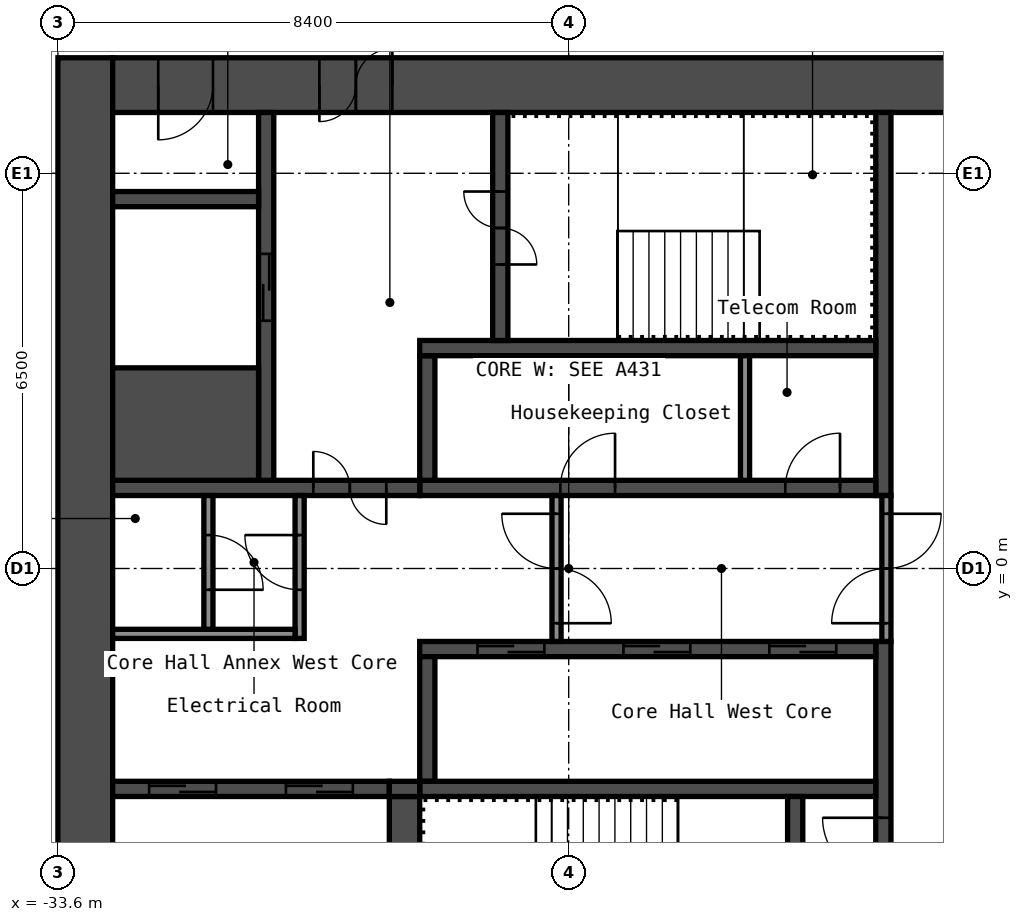
"""IFC4 building model, lengths in metres.
Left out: names, types, materials, properties, quantities, classifications, styles, units other than length and angle.
Written with IfcOpenShell. Run it as: python <this file> out.ifc"""

import sys

from ifc_helpers import new_model, si_unit, direction, frame, frame_2d, origin, place, context, subcontext, project, spatial, rectangle, extrude, element, fill, save


model = new_model("IFC4")
c1 = context("Model", 3, precision=1e-05, world=origin(), true_north=direction((0.0, 1.0)))
c2 = subcontext(c1, "Body", "Model", "MODEL_VIEW")
j1 = project(units=[si_unit("LENGTHUNIT", "METRE"), si_unit("PLANEANGLEUNIT", "RADIAN")], contexts=[c1])
p1 = place(None, origin())
s1 = spatial("IfcSite", under=j1, at=p1, CompositionType="ELEMENT")
p2 = place(p1, origin())
s2 = spatial("IfcBuilding", under=s1, at=p2, CompositionType="ELEMENT")
p3 = place(p2, frame((0.0, 0.0, 215.4)))
s3 = spatial("IfcBuildingStorey", under=s2, at=p3, CompositionType="ELEMENT", Elevation=215.4)
p4 = place(p3, frame((-33.15, -8.4, 0.0), z_axis=(0.0, 0.0, 1.0), x_axis=(0.0, 1.0, 0.0)))
e1 = element("IfcWall", 1, at=p4, inside=s3, PredefinedType="SHEAR", context=c2, shape_type="SweptSolid", body=[
    extrude(rectangle(XDim=16.8, YDim=0.9, at=frame_2d((8.4, 0.0))), origin(), (0.0, 0.0, 1.0), 2.75),
])
p5 = place(p3, frame((-32.7, 7.95, 0.0), z_axis=(0.0, 0.0, 1.0), x_axis=(1.0, 0.0, 0.0)))
e2 = element("IfcWall", 2, at=p5, inside=s3, PredefinedType="SHEAR", context=c2, shape_type="SweptSolid", body=[
    extrude(rectangle(XDim=15.0, YDim=0.9, at=frame_2d((7.5, 0.0))), origin(), (0.0, 0.0, 1.0), 2.75),
])
p6 = place(p5, frame((3.4, 0.0, 0.0)))
e3 = element("IfcOpeningElement", 3, at=p6, cuts=e2, PredefinedType="OPENING", context=c2, shape_type="SweptSolid", body=[
    extrude(rectangle(XDim=1.2, YDim=2.1, at=frame_2d((0.6, 1.05))), frame((0.0, 0.46, 0.0), z_axis=(0.0, -1.0, 0.0), x_axis=(1.0, 0.0, 0.0)), (0.0, 0.0, 1.0), 0.92),
])
p7 = place(p5, frame((0.75, 0.0, 0.0)))
e4 = element("IfcOpeningElement", 4, at=p7, cuts=e2, PredefinedType="OPENING", context=c2, shape_type="SweptSolid", body=[
    extrude(rectangle(XDim=0.9, YDim=2.1, at=frame_2d((0.45, 1.05))), frame((0.0, 0.46, 0.0), z_axis=(0.0, -1.0, 0.0), x_axis=(1.0, 0.0, 0.0)), (0.0, 0.0, 1.0), 0.92),
])
p8 = place(p3, frame((-20.025, 1.2, 0.0), z_axis=(0.0, 0.0, 1.0), x_axis=(0.0, 1.0, 0.0)))
e5 = element("IfcWall", 5, at=p8, inside=s3, PredefinedType="SHEAR", context=c2, shape_type="SweptSolid", body=[
    extrude(rectangle(XDim=6.3, YDim=0.25, at=frame_2d((3.15, 0.0))), origin(), (0.0, 0.0, 1.0), 2.75),
])
p9 = place(p3, frame((-20.025, -7.5, 0.0), z_axis=(0.0, 0.0, 1.0), x_axis=(0.0, 1.0, 0.0)))
e6 = element("IfcWall", 6, at=p9, inside=s3, PredefinedType="SHEAR", context=c2, shape_type="SweptSolid", body=[
    extrude(rectangle(XDim=6.3, YDim=0.25, at=frame_2d((3.15, 0.0))), origin(), (0.0, 0.0, 1.0), 2.75),
])
p10 = place(p9, frame((2.4, 0.0, 0.0)))
e7 = element("IfcOpeningElement", 7, at=p10, cuts=e6, PredefinedType="OPENING", context=c2, shape_type="SweptSolid", body=[
    extrude(rectangle(XDim=1.0, YDim=2.1, at=frame_2d((0.5, 1.05))), frame((0.0, 0.135, 0.0), z_axis=(0.0, -1.0, 0.0), x_axis=(1.0, 0.0, 0.0)), (0.0, 0.0, 1.0), 0.27),
])
p11 = place(p3, frame((-27.65, 1.325, 0.0), z_axis=(0.0, 0.0, 1.0), x_axis=(1.0, 0.0, 0.0)))
e8 = element("IfcWall", 8, at=p11, inside=s3, PredefinedType="SHEAR", context=c2, shape_type="SweptSolid", body=[
    extrude(rectangle(XDim=7.5, YDim=0.25, at=frame_2d((3.75, 0.0))), origin(), (0.0, 0.0, 1.0), 2.75),
])
p12 = place(p11, frame((6.012, 0.0, 0.0)))
e9 = element("IfcOpeningElement", 9, at=p12, cuts=e8, PredefinedType="OPENING", context=c2, shape_type="SweptSolid", body=[
    extrude(rectangle(XDim=0.9, YDim=2.1, at=frame_2d((0.45, 1.05))), frame((0.0, 0.135, 0.0), z_axis=(0.0, -1.0, 0.0), x_axis=(1.0, 0.0, 0.0)), (0.0, 0.0, 1.0), 0.27),
])
p13 = place(p11, frame((2.312, 0.0, 0.0)))
e10 = element("IfcOpeningElement", 10, at=p13, cuts=e8, PredefinedType="OPENING", context=c2, shape_type="SweptSolid", body=[
    extrude(rectangle(XDim=0.9, YDim=2.1, at=frame_2d((0.45, 1.05))), frame((0.0, 0.135, 0.0), z_axis=(0.0, -1.0, 0.0), x_axis=(1.0, 0.0, 0.0)), (0.0, 0.0, 1.0), 0.27),
])
p14 = place(p3, frame((-27.525, 1.45, 0.0), z_axis=(0.0, 0.0, 1.0), x_axis=(0.0, 1.0, 0.0)))
e11 = element("IfcWall", 11, at=p14, inside=s3, PredefinedType="SHEAR", context=c2, shape_type="SweptSolid", body=[
    extrude(rectangle(XDim=2.05, YDim=0.25, at=frame_2d((1.025, 0.0))), origin(), (0.0, 0.0, 1.0), 2.75),
])
p15 = place(p3, frame((-27.65, 3.625, 0.0), z_axis=(0.0, 0.0, 1.0), x_axis=(1.0, 0.0, 0.0)))
e12 = element("IfcWall", 12, at=p15, inside=s3, PredefinedType="SHEAR", context=c2, shape_type="SweptSolid", body=[
    extrude(rectangle(XDim=7.5, YDim=0.25, at=frame_2d((3.75, 0.0))), origin(), (0.0, 0.0, 1.0), 2.75),
])
p16 = place(p3, frame((-26.325, 3.75, 0.0), z_axis=(0.0, 0.0, 1.0), x_axis=(0.0, 1.0, 0.0)))
e13 = element("IfcWall", 13, at=p16, inside=s3, PredefinedType="SHEAR", context=c2, shape_type="SweptSolid", body=[
    extrude(rectangle(XDim=3.75, YDim=0.25, at=frame_2d((1.875, 0.0))), origin(), (0.0, 0.0, 1.0), 2.75),
])
p17 = place(p16, frame((1.25, 0.0, 0.0)))
e14 = element("IfcOpeningElement", 14, at=p17, cuts=e13, PredefinedType="OPENING", context=c2, shape_type="SweptSolid", body=[
    extrude(rectangle(XDim=1.2, YDim=2.1, at=frame_2d((0.6, 1.05))), frame((0.0, 0.135, 0.0), z_axis=(0.0, -1.0, 0.0), x_axis=(1.0, 0.0, 0.0)), (0.0, 0.0, 1.0), 0.27),
])
p18 = place(p3, frame((-32.7, 1.325, 0.0), z_axis=(0.0, 0.0, 1.0), x_axis=(1.0, 0.0, 0.0)))
e15 = element("IfcWall", 15, at=p18, inside=s3, PredefinedType="SHEAR", context=c2, shape_type="SweptSolid", body=[
    extrude(rectangle(XDim=5.05, YDim=0.25, at=frame_2d((2.525, 0.0))), origin(), (0.0, 0.0, 1.0), 2.75),
])
p19 = place(p18, frame((3.3, 0.0, 0.0)))
e16 = element("IfcOpeningElement", 16, at=p19, cuts=e15, PredefinedType="OPENING", context=c2, shape_type="SweptSolid", body=[
    extrude(rectangle(XDim=1.2, YDim=2.1, at=frame_2d((0.6, 1.05))), frame((0.0, 0.135, 0.0), z_axis=(0.0, -1.0, 0.0), x_axis=(1.0, 0.0, 0.0)), (0.0, 0.0, 1.0), 0.27),
])
p20 = place(p3, frame((-30.175, 1.45, 0.0), z_axis=(0.0, 0.0, 1.0), x_axis=(0.0, 1.0, 0.0)))
e17 = element("IfcWall", 17, at=p20, inside=s3, PredefinedType="SHEAR", context=c2, shape_type="SweptSolid", body=[
    extrude(rectangle(XDim=6.05, YDim=0.25, at=frame_2d((3.025, 0.0))), origin(), (0.0, 0.0, 1.0), 2.75),
])
p21 = place(p20, frame((2.625, 0.0, 0.0)))
e18 = element("IfcOpeningElement", 18, at=p21, cuts=e17, PredefinedType="OPENING", context=c2, shape_type="SweptSolid", body=[
    extrude(rectangle(XDim=1.1, YDim=2.1, at=frame_2d((0.55, 1.05))), frame((0.0, 0.135, 0.0), z_axis=(0.0, -1.0, 0.0), x_axis=(1.0, 0.0, 0.0)), (0.0, 0.0, 1.0), 0.27),
])
p22 = place(p3, frame((-32.7, 2.375, 0.0), z_axis=(0.0, 0.0, 1.0), x_axis=(1.0, 0.0, 0.0)))
e19 = element("IfcWall", 19, at=p22, inside=s3, PredefinedType="SHEAR", context=c2, shape_type="SweptSolid", body=[
    extrude(rectangle(XDim=2.4, YDim=1.85, at=frame_2d((1.2, 0.0))), origin(), (0.0, 0.0, 1.0), 2.75),
])
p23 = place(p3, frame((-32.7, 6.075, 0.0), z_axis=(0.0, 0.0, 1.0), x_axis=(1.0, 0.0, 0.0)))
e20 = element("IfcWall", 20, at=p23, inside=s3, PredefinedType="SHEAR", context=c2, shape_type="SweptSolid", body=[
    extrude(rectangle(XDim=2.4, YDim=0.25, at=frame_2d((1.2, 0.0))), origin(), (0.0, 0.0, 1.0), 2.75),
])
p24 = place(p3, frame((-27.65, -1.325, 0.0), z_axis=(0.0, 0.0, 1.0), x_axis=(1.0, 0.0, 0.0)))
e21 = element("IfcWall", 21, at=p24, inside=s3, PredefinedType="SHEAR", context=c2, shape_type="SweptSolid", body=[
    extrude(rectangle(XDim=7.5, YDim=0.25, at=frame_2d((3.75, 0.0))), origin(), (0.0, 0.0, 1.0), 2.75),
])
p25 = place(p24, frame((5.75, 0.0, 0.0)))
e22 = element("IfcOpeningElement", 22, at=p25, cuts=e21, PredefinedType="OPENING", context=c2, shape_type="SweptSolid", body=[
    extrude(rectangle(XDim=1.1, YDim=2.1, at=frame_2d((0.55, 1.05))), frame((0.0, 0.135, 0.0), z_axis=(0.0, -1.0, 0.0), x_axis=(1.0, 0.0, 0.0)), (0.0, 0.0, 1.0), 0.27),
])
p26 = place(p24, frame((3.35, 0.0, 0.0)))
e23 = element("IfcOpeningElement", 23, at=p26, cuts=e21, PredefinedType="OPENING", context=c2, shape_type="SweptSolid", body=[
    extrude(rectangle(XDim=1.1, YDim=2.1, at=frame_2d((0.55, 1.05))), frame((0.0, 0.135, 0.0), z_axis=(0.0, -1.0, 0.0), x_axis=(1.0, 0.0, 0.0)), (0.0, 0.0, 1.0), 0.27),
])
p27 = place(p24, frame((0.95, 0.0, 0.0)))
e24 = element("IfcOpeningElement", 24, at=p27, cuts=e21, PredefinedType="OPENING", context=c2, shape_type="SweptSolid", body=[
    extrude(rectangle(XDim=1.1, YDim=2.1, at=frame_2d((0.55, 1.05))), frame((0.0, 0.135, 0.0), z_axis=(0.0, -1.0, 0.0), x_axis=(1.0, 0.0, 0.0)), (0.0, 0.0, 1.0), 0.27),
])
p28 = place(p3, frame((-27.525, -3.5, 0.0), z_axis=(0.0, 0.0, 1.0), x_axis=(0.0, 1.0, 0.0)))
e25 = element("IfcWall", 25, at=p28, inside=s3, PredefinedType="SHEAR", context=c2, shape_type="SweptSolid", body=[
    extrude(rectangle(XDim=2.05, YDim=0.25, at=frame_2d((1.025, 0.0))), origin(), (0.0, 0.0, 1.0), 2.75),
])
p29 = place(p3, frame((-27.65, -3.625, 0.0), z_axis=(0.0, 0.0, 1.0), x_axis=(1.0, 0.0, 0.0)))
e26 = element("IfcWall", 26, at=p29, inside=s3, PredefinedType="SHEAR", context=c2, shape_type="SweptSolid", body=[
    extrude(rectangle(XDim=7.5, YDim=0.25, at=frame_2d((3.75, 0.0))), origin(), (0.0, 0.0, 1.0), 2.75),
])
p30 = place(p3, frame((-21.475, -7.5, 0.0), z_axis=(0.0, 0.0, 1.0), x_axis=(0.0, 1.0, 0.0)))
e27 = element("IfcWall", 27, at=p30, inside=s3, PredefinedType="SHEAR", context=c2, shape_type="SweptSolid", body=[
    extrude(rectangle(XDim=3.75, YDim=0.25, at=frame_2d((1.875, 0.0))), origin(), (0.0, 0.0, 1.0), 2.75),
])
p31 = place(p30, frame((1.3, 0.0, 0.0)))
e28 = element("IfcOpeningElement", 28, at=p31, cuts=e27, PredefinedType="OPENING", context=c2, shape_type="SweptSolid", body=[
    extrude(rectangle(XDim=1.2, YDim=2.1, at=frame_2d((0.6, 1.05))), frame((0.0, 0.135, 0.0), z_axis=(0.0, -1.0, 0.0), x_axis=(1.0, 0.0, 0.0)), (0.0, 0.0, 1.0), 0.27),
])
p32 = place(p3, frame((-27.9, -7.5, 0.0), z_axis=(0.0, 0.0, 1.0), x_axis=(0.0, 1.0, 0.0)))
e29 = element("IfcWall", 29, at=p32, inside=s3, PredefinedType="SHEAR", context=c2, shape_type="SweptSolid", body=[
    extrude(rectangle(XDim=3.75, YDim=0.5, at=frame_2d((1.875, 0.0))), origin(), (0.0, 0.0, 1.0), 2.75),
])
p33 = place(p3, frame((-32.7, -3.625, 0.0), z_axis=(0.0, 0.0, 1.0), x_axis=(1.0, 0.0, 0.0)))
e30 = element("IfcWall", 30, at=p33, inside=s3, PredefinedType="SHEAR", context=c2, shape_type="SweptSolid", body=[
    extrude(rectangle(XDim=4.55, YDim=0.25, at=frame_2d((2.275, 0.0))), origin(), (0.0, 0.0, 1.0), 2.75),
])
p34 = place(p33, frame((2.85, 0.0, 0.0)))
e31 = element("IfcOpeningElement", 31, at=p34, cuts=e30, PredefinedType="OPENING", context=c2, shape_type="SweptSolid", body=[
    extrude(rectangle(XDim=1.1, YDim=2.1, at=frame_2d((0.55, 1.05))), frame((0.0, 0.135, 0.0), z_axis=(0.0, -1.0, 0.0), x_axis=(1.0, 0.0, 0.0)), (0.0, 0.0, 1.0), 0.27),
])
p35 = place(p33, frame((0.6, 0.0, 0.0)))
e32 = element("IfcOpeningElement", 32, at=p35, cuts=e30, PredefinedType="OPENING", context=c2, shape_type="SweptSolid", body=[
    extrude(rectangle(XDim=1.1, YDim=2.1, at=frame_2d((0.55, 1.05))), frame((0.0, 0.135, 0.0), z_axis=(0.0, -1.0, 0.0), x_axis=(1.0, 0.0, 0.0)), (0.0, 0.0, 1.0), 0.27),
])
p36 = place(p3, frame((-28.15, -3.625, 0.0), z_axis=(0.0, 0.0, 1.0), x_axis=(1.0, 0.0, 0.0)))
e33 = element("IfcWall", 33, at=p36, inside=s3, PredefinedType="SHEAR", context=c2, shape_type="SweptSolid", body=[
    extrude(rectangle(XDim=0.5, YDim=0.25, at=frame_2d((0.25, 0.0))), origin(), (0.0, 0.0, 1.0), 2.75),
])
p37 = place(p3, frame((-19.975, -1.2, 0.0), z_axis=(0.0, 0.0, 1.0), x_axis=(0.0, 1.0, 0.0)))
e34 = element("IfcWall", 34, at=p37, inside=s3, PredefinedType="PARTITIONING", context=c2, shape_type="SweptSolid", body=[
    extrude(rectangle(XDim=2.4, YDim=0.15, at=frame_2d((1.2, 0.0))), origin(), (0.0, 0.0, 1.0), 2.75),
])
p38 = place(p37, frame((0.3, 0.0, 0.0)))
e35 = element("IfcOpeningElement", 35, at=p38, cuts=e34, PredefinedType="OPENING", context=c2, shape_type="SweptSolid", body=[
    extrude(rectangle(XDim=1.8, YDim=2.1, at=frame_2d((0.9, 1.05))), frame((0.0, 0.085, 0.0), z_axis=(0.0, -1.0, 0.0), x_axis=(1.0, 0.0, 0.0)), (0.0, 0.0, 1.0), 0.17),
])
p39 = place(p3, frame((-25.4, -1.2, 0.0), z_axis=(0.0, 0.0, 1.0), x_axis=(0.0, 1.0, 0.0)))
e36 = element("IfcWall", 36, at=p39, inside=s3, PredefinedType="PARTITIONING", context=c2, shape_type="SweptSolid", body=[
    extrude(rectangle(XDim=2.4, YDim=0.15, at=frame_2d((1.2, 0.0))), origin(), (0.0, 0.0, 1.0), 2.75),
])
p40 = place(p39, frame((0.3, 0.0, 0.0)))
e37 = element("IfcOpeningElement", 37, at=p40, cuts=e36, PredefinedType="OPENING", context=c2, shape_type="SweptSolid", body=[
    extrude(rectangle(XDim=1.8, YDim=2.1, at=frame_2d((0.9, 1.05))), frame((0.0, 0.085, 0.0), z_axis=(0.0, -1.0, 0.0), x_axis=(1.0, 0.0, 0.0)), (0.0, 0.0, 1.0), 0.17),
])
p41 = place(p3, frame((-29.625, -1.15, 0.0), z_axis=(0.0, 0.0, 1.0), x_axis=(0.0, 1.0, 0.0)))
e38 = element("IfcWall", 38, at=p41, inside=s3, PredefinedType="PARTITIONING", context=c2, shape_type="SweptSolid", body=[
    extrude(rectangle(XDim=2.35, YDim=0.15, at=frame_2d((1.175, 0.0))), origin(), (0.0, 0.0, 1.0), 2.75),
])
p42 = place(p41, frame((0.8, 0.0, 0.0)))
e39 = element("IfcOpeningElement", 39, at=p42, cuts=e38, PredefinedType="OPENING", context=c2, shape_type="SweptSolid", body=[
    extrude(rectangle(XDim=0.9, YDim=2.1, at=frame_2d((0.45, 1.05))), frame((0.0, 0.085, 0.0), z_axis=(0.0, -1.0, 0.0), x_axis=(1.0, 0.0, 0.0)), (0.0, 0.0, 1.0), 0.17),
])
p43 = place(p3, frame((-32.7, -1.075, 0.0), z_axis=(0.0, 0.0, 1.0), x_axis=(1.0, 0.0, 0.0)))
e40 = element("IfcWall", 40, at=p43, inside=s3, PredefinedType="PARTITIONING", context=c2, shape_type="SweptSolid", body=[
    extrude(rectangle(XDim=3.0, YDim=0.15, at=frame_2d((1.5, 0.0))), origin(), (0.0, 0.0, 1.0), 2.75),
])
p44 = place(p3, frame((-31.125, -1.0, 0.0), z_axis=(0.0, 0.0, 1.0), x_axis=(0.0, 1.0, 0.0)))
e41 = element("IfcWall", 41, at=p44, inside=s3, PredefinedType="PARTITIONING", context=c2, shape_type="SweptSolid", body=[
    extrude(rectangle(XDim=2.2, YDim=0.15, at=frame_2d((1.1, 0.0))), origin(), (0.0, 0.0, 1.0), 2.75),
])
p45 = place(p44, frame((0.65, 0.0, 0.0)))
e42 = element("IfcOpeningElement", 42, at=p45, cuts=e41, PredefinedType="OPENING", context=c2, shape_type="SweptSolid", body=[
    extrude(rectangle(XDim=0.9, YDim=2.1, at=frame_2d((0.45, 1.05))), frame((0.0, 0.085, 0.0), z_axis=(0.0, -1.0, 0.0), x_axis=(1.0, 0.0, 0.0)), (0.0, 0.0, 1.0), 0.17),
])
p46 = place(p3, frame((-22.3, 1.45, 0.0), z_axis=(0.0, 0.0, 1.0), x_axis=(0.0, 1.0, 0.0)))
e43 = element("IfcWall", 43, at=p46, inside=s3, PredefinedType="PARTITIONING", context=c2, shape_type="SweptSolid", body=[
    extrude(rectangle(XDim=2.05, YDim=0.15, at=frame_2d((1.025, 0.0))), origin(), (0.0, 0.0, 1.0), 2.75),
])
p47 = place(p6, origin())
e44 = element("IfcDoor", 44, at=p47, inside=s3, OperationType="DOUBLE_DOOR_SINGLE_SWING", PredefinedType="DOOR", context=c2, shape_type="SweptSolid", body=[
    extrude(rectangle(XDim=1.2, YDim=2.1, at=frame_2d((0.6, 1.05))), frame((0.0, 0.025, 0.0), z_axis=(0.0, -1.0, 0.0), x_axis=(1.0, 0.0, 0.0)), (0.0, 0.0, 1.0), 0.05),
])
fill(e3, e44)
p48 = place(p7, origin())
e45 = element("IfcDoor", 45, at=p48, inside=s3, OperationType="SINGLE_SWING_LEFT", PredefinedType="DOOR", context=c2, shape_type="SweptSolid", body=[
    extrude(rectangle(XDim=0.9, YDim=2.1, at=frame_2d((0.45, 1.05))), frame((0.0, 0.025, 0.0), z_axis=(0.0, -1.0, 0.0), x_axis=(1.0, 0.0, 0.0)), (0.0, 0.0, 1.0), 0.05),
])
fill(e4, e45)
p49 = place(p17, origin())
e46 = element("IfcDoor", 46, at=p49, inside=s3, OperationType="DOUBLE_DOOR_SINGLE_SWING", PredefinedType="DOOR", context=c2, shape_type="SweptSolid", body=[
    extrude(rectangle(XDim=1.2, YDim=2.1, at=frame_2d((0.6, 1.05))), frame((0.0, 0.025, 0.0), z_axis=(0.0, -1.0, 0.0), x_axis=(1.0, 0.0, 0.0)), (0.0, 0.0, 1.0), 0.05),
])
fill(e14, e46)
p50 = place(p10, origin())
e47 = element("IfcDoor", 47, at=p50, inside=s3, OperationType="SINGLE_SWING_LEFT", PredefinedType="DOOR", context=c2, shape_type="SweptSolid", body=[
    extrude(rectangle(XDim=1.0, YDim=2.1, at=frame_2d((0.5, 1.05))), frame((0.0, 0.025, 0.0), z_axis=(0.0, -1.0, 0.0), x_axis=(1.0, 0.0, 0.0)), (0.0, 0.0, 1.0), 0.05),
])
fill(e7, e47)
p51 = place(p19, origin())
e48 = element("IfcDoor", 48, at=p51, inside=s3, OperationType="DOUBLE_DOOR_SINGLE_SWING", PredefinedType="DOOR", context=c2, shape_type="SweptSolid", body=[
    extrude(rectangle(XDim=1.2, YDim=2.1, at=frame_2d((0.6, 1.05))), frame((0.0, 0.025, 0.0), z_axis=(0.0, -1.0, 0.0), x_axis=(1.0, 0.0, 0.0)), (0.0, 0.0, 1.0), 0.05),
])
fill(e16, e48)
p52 = place(p38, origin())
e49 = element("IfcDoor", 49, at=p52, inside=s3, OperationType="DOUBLE_DOOR_SINGLE_SWING", PredefinedType="DOOR", context=c2, shape_type="SweptSolid", body=[
    extrude(rectangle(XDim=1.8, YDim=2.1, at=frame_2d((0.9, 1.05))), frame((0.0, 0.025, 0.0), z_axis=(0.0, -1.0, 0.0), x_axis=(1.0, 0.0, 0.0)), (0.0, 0.0, 1.0), 0.05),
])
fill(e35, e49)
p53 = place(p40, origin())
e50 = element("IfcDoor", 50, at=p53, inside=s3, OperationType="DOUBLE_DOOR_SINGLE_SWING", PredefinedType="DOOR", context=c2, shape_type="SweptSolid", body=[
    extrude(rectangle(XDim=1.8, YDim=2.1, at=frame_2d((0.9, 1.05))), frame((0.0, 0.025, 0.0), z_axis=(0.0, -1.0, 0.0), x_axis=(1.0, 0.0, 0.0)), (0.0, 0.0, 1.0), 0.05),
])
fill(e37, e50)
p54 = place(p42, origin())
e51 = element("IfcDoor", 51, at=p54, inside=s3, OperationType="SINGLE_SWING_LEFT", PredefinedType="DOOR", context=c2, shape_type="SweptSolid", body=[
    extrude(rectangle(XDim=0.9, YDim=2.1, at=frame_2d((0.45, 1.05))), frame((0.0, 0.025, 0.0), z_axis=(0.0, -1.0, 0.0), x_axis=(1.0, 0.0, 0.0)), (0.0, 0.0, 1.0), 0.05),
])
fill(e39, e51)
p55 = place(p45, origin())
e52 = element("IfcDoor", 52, at=p55, inside=s3, OperationType="SINGLE_SWING_LEFT", PredefinedType="DOOR", context=c2, shape_type="SweptSolid", body=[
    extrude(rectangle(XDim=0.9, YDim=2.1, at=frame_2d((0.45, 1.05))), frame((0.0, 0.025, 0.0), z_axis=(0.0, -1.0, 0.0), x_axis=(1.0, 0.0, 0.0)), (0.0, 0.0, 1.0), 0.05),
])
fill(e42, e52)
p56 = place(p12, origin())
e53 = element("IfcDoor", 53, at=p56, inside=s3, OperationType="SINGLE_SWING_LEFT", PredefinedType="DOOR", context=c2, shape_type="SweptSolid", body=[
    extrude(rectangle(XDim=0.9, YDim=2.1, at=frame_2d((0.45, 1.05))), frame((0.0, 0.025, 0.0), z_axis=(0.0, -1.0, 0.0), x_axis=(1.0, 0.0, 0.0)), (0.0, 0.0, 1.0), 0.05),
])
fill(e9, e53)
p57 = place(p13, origin())
e54 = element("IfcDoor", 54, at=p57, inside=s3, OperationType="SINGLE_SWING_LEFT", PredefinedType="DOOR", context=c2, shape_type="SweptSolid", body=[
    extrude(rectangle(XDim=0.9, YDim=2.1, at=frame_2d((0.45, 1.05))), frame((0.0, 0.025, 0.0), z_axis=(0.0, -1.0, 0.0), x_axis=(1.0, 0.0, 0.0)), (0.0, 0.0, 1.0), 0.05),
])
fill(e10, e54)
p58 = place(p25, origin())
e55 = element("IfcDoor", 55, at=p58, inside=s3, OperationType="DOUBLE_DOOR_SLIDING", PredefinedType="DOOR", context=c2, shape_type="SweptSolid", body=[
    extrude(rectangle(XDim=1.1, YDim=2.1, at=frame_2d((0.55, 1.05))), frame((0.0, 0.025, 0.0), z_axis=(0.0, -1.0, 0.0), x_axis=(1.0, 0.0, 0.0)), (0.0, 0.0, 1.0), 0.05),
])
fill(e22, e55)
p59 = place(p26, origin())
e56 = element("IfcDoor", 56, at=p59, inside=s3, OperationType="DOUBLE_DOOR_SLIDING", PredefinedType="DOOR", context=c2, shape_type="SweptSolid", body=[
    extrude(rectangle(XDim=1.1, YDim=2.1, at=frame_2d((0.55, 1.05))), frame((0.0, 0.025, 0.0), z_axis=(0.0, -1.0, 0.0), x_axis=(1.0, 0.0, 0.0)), (0.0, 0.0, 1.0), 0.05),
])
fill(e23, e56)
p60 = place(p27, origin())
e57 = element("IfcDoor", 57, at=p60, inside=s3, OperationType="DOUBLE_DOOR_SLIDING", PredefinedType="DOOR", context=c2, shape_type="SweptSolid", body=[
    extrude(rectangle(XDim=1.1, YDim=2.1, at=frame_2d((0.55, 1.05))), frame((0.0, 0.025, 0.0), z_axis=(0.0, -1.0, 0.0), x_axis=(1.0, 0.0, 0.0)), (0.0, 0.0, 1.0), 0.05),
])
fill(e24, e57)
p61 = place(p21, origin())
e58 = element("IfcDoor", 58, at=p61, inside=s3, OperationType="DOUBLE_DOOR_SLIDING", PredefinedType="DOOR", context=c2, shape_type="SweptSolid", body=[
    extrude(rectangle(XDim=1.1, YDim=2.1, at=frame_2d((0.55, 1.05))), frame((0.0, 0.025, 0.0), z_axis=(0.0, -1.0, 0.0), x_axis=(1.0, 0.0, 0.0)), (0.0, 0.0, 1.0), 0.05),
])
fill(e18, e58)
p62 = place(p34, origin())
e59 = element("IfcDoor", 59, at=p62, inside=s3, OperationType="DOUBLE_DOOR_SLIDING", PredefinedType="DOOR", context=c2, shape_type="SweptSolid", body=[
    extrude(rectangle(XDim=1.1, YDim=2.1, at=frame_2d((0.55, 1.05))), frame((0.0, 0.025, 0.0), z_axis=(0.0, -1.0, 0.0), x_axis=(1.0, 0.0, 0.0)), (0.0, 0.0, 1.0), 0.05),
])
fill(e31, e59)
p63 = place(p35, origin())
e60 = element("IfcDoor", 60, at=p63, inside=s3, OperationType="DOUBLE_DOOR_SLIDING", PredefinedType="DOOR", context=c2, shape_type="SweptSolid", body=[
    extrude(rectangle(XDim=1.1, YDim=2.1, at=frame_2d((0.55, 1.05))), frame((0.0, 0.025, 0.0), z_axis=(0.0, -1.0, 0.0), x_axis=(1.0, 0.0, 0.0)), (0.0, 0.0, 1.0), 0.05),
])
fill(e32, e60)
save(model, sys.argv[1])
